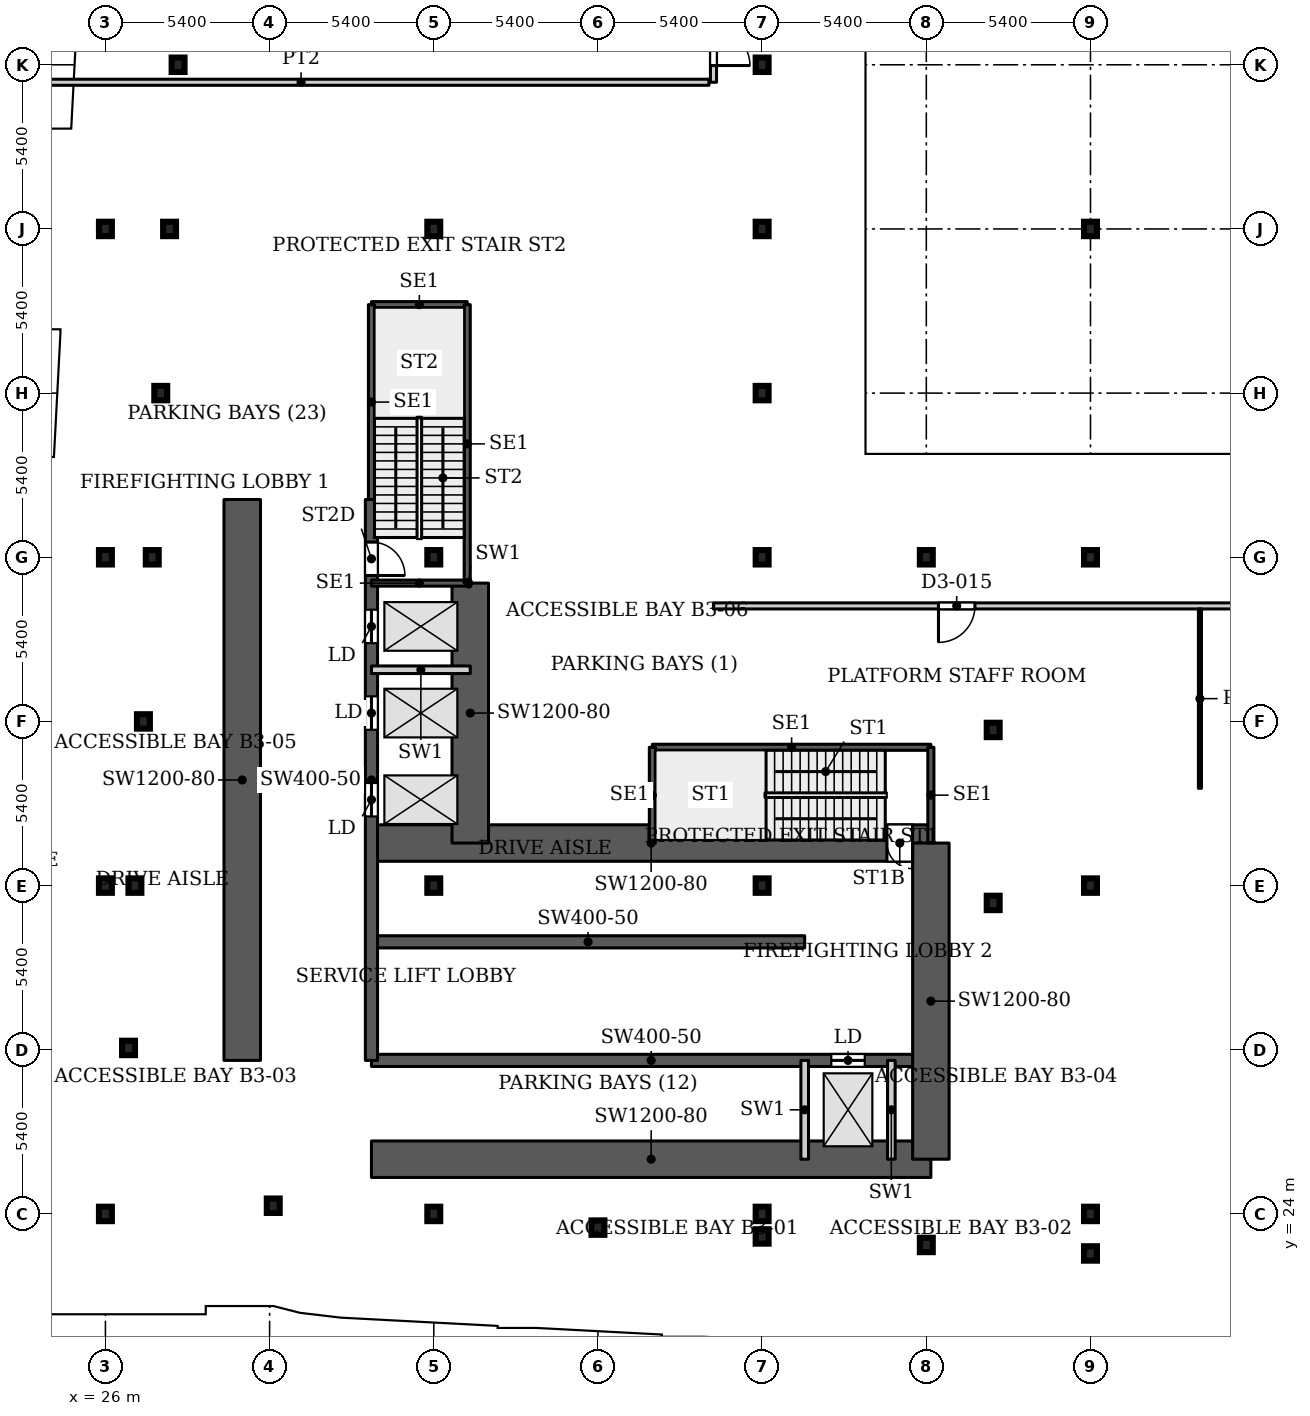
"""IFC4 building model, lengths in metres.
Left out: names, types, materials, properties, quantities, classifications, styles, units other than length and angle.
Written with IfcOpenShell. Run it as: python <this file> out.ifc"""

import sys

from ifc_helpers import new_model, si_unit, direction, frame, frame_2d, origin, origin_2d, place, context, subcontext, project, spatial, rectangle, i_section, extrude, source, transform, mapped, element, fill, save


model = new_model("IFC4")
c1 = context("Model", 3, precision=1e-05, world=origin(), true_north=direction((0.0, 1.0)))
c2 = subcontext(c1, "Body", "Model", "MODEL_VIEW")
j1 = project(units=[si_unit("LENGTHUNIT", "METRE"), si_unit("PLANEANGLEUNIT", "RADIAN")], contexts=[c1])
p1 = place(None, origin())
s1 = spatial("IfcSite", under=j1, at=p1, CompositionType="ELEMENT")
p2 = place(p1, origin())
s2 = spatial("IfcBuilding", under=s1, at=p2, CompositionType="ELEMENT")
p3 = place(p2, frame((0.0, 0.0, -15.0)))
s3 = spatial("IfcBuildingStorey", under=s2, at=p3, CompositionType="ELEMENT", Elevation=-15.0)
for number, where, z_axis, x_axis in (
    (1, (26.0, 24.0, 0.0), (0.0, 0.0, 1.0), (1.0, 0.0, 0.0)),
    (2, (36.8, 24.0, 0.0), (0.0, 0.0, 1.0), (1.0, 0.0, 0.0)),
    (3, (47.6, 24.0, 0.0), (0.0, 0.0, 1.0), (1.0, 0.0, 0.0)),
    (4, (58.4, 24.0, 0.0), (0.0, 0.0, 1.0), (1.0, 0.0, 0.0)),
    (5, (26.0, 34.8, 0.0), (0.0, 0.0, 1.0), (1.0, 0.0, 0.0)),
    (6, (36.8, 34.8, 0.0), (0.0, 0.0, 1.0), (1.0, 0.0, 0.0)),
    (7, (47.6, 34.8, 0.0), (0.0, 0.0, 1.0), (1.0, 0.0, 0.0)),
    (8, (58.4, 34.8, 0.0), (0.0, 0.0, 1.0), (1.0, 0.0, 0.0)),
    (9, (26.0, 45.6, 0.0), (0.0, 0.0, 1.0), (1.0, 0.0, 0.0)),
    (10, (36.8, 45.6, 0.0), (0.0, 0.0, 1.0), (1.0, 0.0, 0.0)),
    (11, (47.6, 45.6, 0.0), (0.0, 0.0, 1.0), (1.0, 0.0, 0.0)),
    (12, (58.4, 45.6, 0.0), (0.0, 0.0, 1.0), (1.0, 0.0, 0.0)),
    (13, (26.0, 56.4, 0.0), (0.0, 0.0, 1.0), (1.0, 0.0, 0.0)),
    (14, (36.8, 56.4, 0.0), (0.0, 0.0, 1.0), (1.0, 0.0, 0.0)),
    (15, (47.6, 56.4, 0.0), (0.0, 0.0, 1.0), (1.0, 0.0, 0.0)),
    (16, (58.4, 56.4, 0.0), (0.0, 0.0, 1.0), (1.0, 0.0, 0.0)),
    (17, (58.4, 22.7, 0.0), (0.0, 0.0, 1.0), (1.0, 0.0, 0.0)),
    (18, (53.0, 22.98, 0.0), (0.0, 0.0, 1.0), (1.0, 0.0, 0.0)),
    (19, (47.6, 23.26, 0.0), (0.0, 0.0, 1.0), (1.0, 0.0, 0.0)),
    (20, (42.2, 23.55, 0.0), (0.0, 0.0, 1.0), (1.0, 0.0, 0.0)),
    (21, (31.52, 24.27, 0.0), (0.0, 0.0, 1.0), (1.0, 0.0, 0.0)),
    (22, (26.76, 29.46, 0.0), (0.0, 0.0, 1.0), (1.0, 0.0, 0.0)),
    (23, (26.97, 34.8, 0.0), (0.0, 0.0, 1.0), (1.0, 0.0, 0.0)),
    (24, (27.25, 40.2, 0.0), (0.0, 0.0, 1.0), (1.0, 0.0, 0.0)),
    (25, (27.54, 45.6, 0.0), (0.0, 0.0, 1.0), (1.0, 0.0, 0.0)),
    (26, (53.0, 45.6, 0.0), (0.0, 0.0, 1.0), (1.0, 0.0, 0.0)),
    (27, (27.82, 51.0, 0.0), (0.0, 0.0, 1.0), (1.0, 0.0, 0.0)),
    (28, (47.6, 51.0, 0.0), (0.0, 0.0, 1.0), (1.0, 0.0, 0.0)),
    (29, (28.11, 56.4, 0.0), (0.0, 0.0, 1.0), (1.0, 0.0, 0.0)),
    (30, (28.39, 61.8, 0.0), (0.0, 0.0, 1.0), (1.0, 0.0, 0.0)),
    (31, (47.6, 61.8, 0.0), (0.0, 0.0, 1.0), (1.0, 0.0, 0.0)),
    (32, (55.2, 34.23, 0.0), (0.0, 0.0, 1.0), (1.0, 0.0, 0.0)),
    (33, (55.2, 39.92, 0.0), (0.0, 0.0, 1.0), (1.0, 0.0, 0.0)),
):
    element("IfcColumn", number, at=place(p3, frame(where, z_axis=z_axis, x_axis=x_axis)), inside=s3, PredefinedType="COLUMN", context=c2, shape_type="SweptSolid", body=[
        extrude(i_section(OverallWidth=0.424, OverallDepth=0.474, WebThickness=0.048, FlangeThickness=0.077, FilletRadius=0.014, at=origin_2d()), origin(), (0.0, 0.0, 1.0), 5.0),
    ])
p4 = place(p3, frame((34.75, 25.8, 0.0), z_axis=(0.0, 0.0, 1.0), x_axis=(1.0, 0.0, 0.0)))
e34 = element("IfcWall", 34, at=p4, inside=s3, PredefinedType="SHEAR", context=c2, shape_type="SweptSolid", body=[
    extrude(rectangle(XDim=18.4, YDim=1.2, at=frame_2d((9.2, 0.0))), origin(), (0.0, 0.0, 1.0), 5.0),
])
p5 = place(p3, frame((34.75, 29.05, 0.0), z_axis=(0.0, 0.0, 1.0), x_axis=(1.0, 0.0, 0.0)))
e35 = element("IfcWall", 35, at=p5, inside=s3, PredefinedType="SHEAR", context=c2, shape_type="SweptSolid", body=[
    extrude(rectangle(XDim=18.4, YDim=0.4, at=frame_2d((9.2, 0.0))), origin(), (0.0, 0.0, 1.0), 5.0),
])
p6 = place(p5, frame((15.125, 0.0, 0.0)))
e36 = element("IfcOpeningElement", 36, at=p6, cuts=e35, PredefinedType="OPENING", context=c2, shape_type="SweptSolid", body=[
    extrude(rectangle(XDim=1.1, YDim=2.2, at=frame_2d((0.55, 1.1))), frame((0.0, 0.21, 0.0), z_axis=(0.0, -1.0, 0.0), x_axis=(1.0, 0.0, 0.0)), (0.0, 0.0, 1.0), 0.42),
])
p7 = place(p3, frame((34.75, 32.95, 0.0), z_axis=(0.0, 0.0, 1.0), x_axis=(1.0, 0.0, 0.0)))
e37 = element("IfcWall", 37, at=p7, inside=s3, PredefinedType="SHEAR", context=c2, shape_type="SweptSolid", body=[
    extrude(rectangle(XDim=14.25, YDim=0.4, at=frame_2d((7.125, 0.0))), origin(), (0.0, 0.0, 1.0), 5.0),
])
p8 = place(p3, frame((34.75, 36.2, 0.0), z_axis=(0.0, 0.0, 1.0), x_axis=(1.0, 0.0, 0.0)))
e38 = element("IfcWall", 38, at=p8, inside=s3, PredefinedType="SHEAR", context=c2, shape_type="SweptSolid", body=[
    extrude(rectangle(XDim=18.4, YDim=1.2, at=frame_2d((9.2, 0.0))), origin(), (0.0, 0.0, 1.0), 5.0),
])
p9 = place(p8, frame((16.955, 0.0, 0.0)))
e39 = element("IfcOpeningElement", 39, at=p9, cuts=e38, PredefinedType="OPENING", context=c2, shape_type="SweptSolid", body=[
    extrude(rectangle(XDim=0.843, YDim=2.2, at=frame_2d((0.421, 1.1))), frame((0.0, 0.61, 0.0), z_axis=(0.0, -1.0, 0.0), x_axis=(1.0, 0.0, 0.0)), (0.0, 0.0, 1.0), 1.22),
])
p10 = place(p3, frame((34.75, 29.05, 0.0), z_axis=(0.0, 0.0, 1.0), x_axis=(0.0, 1.0, 0.0)))
e40 = element("IfcWall", 40, at=p10, inside=s3, PredefinedType="SHEAR", context=c2, shape_type="SweptSolid", body=[
    extrude(rectangle(XDim=18.45, YDim=0.4, at=frame_2d((9.225, 0.0))), origin(), (0.0, 0.0, 1.0), 5.0),
])
p11 = place(p10, frame((8.025, 0.0, 0.0)))
e41 = element("IfcOpeningElement", 41, at=p11, cuts=e40, PredefinedType="OPENING", context=c2, shape_type="SweptSolid", body=[
    extrude(rectangle(XDim=1.1, YDim=2.2, at=frame_2d((0.55, 1.1))), frame((0.0, 0.21, 0.0), z_axis=(0.0, -1.0, 0.0), x_axis=(1.0, 0.0, 0.0)), (0.0, 0.0, 1.0), 0.42),
])
p12 = place(p10, frame((10.875, 0.0, 0.0)))
e42 = element("IfcOpeningElement", 42, at=p12, cuts=e40, PredefinedType="OPENING", context=c2, shape_type="SweptSolid", body=[
    extrude(rectangle(XDim=1.1, YDim=2.2, at=frame_2d((0.55, 1.1))), frame((0.0, 0.21, 0.0), z_axis=(0.0, -1.0, 0.0), x_axis=(1.0, 0.0, 0.0)), (0.0, 0.0, 1.0), 0.42),
])
p13 = place(p10, frame((13.725, 0.0, 0.0)))
e43 = element("IfcOpeningElement", 43, at=p13, cuts=e40, PredefinedType="OPENING", context=c2, shape_type="SweptSolid", body=[
    extrude(rectangle(XDim=1.1, YDim=2.2, at=frame_2d((0.55, 1.1))), frame((0.0, 0.21, 0.0), z_axis=(0.0, -1.0, 0.0), x_axis=(1.0, 0.0, 0.0)), (0.0, 0.0, 1.0), 0.42),
])
p14 = place(p10, frame((15.95, 0.0, 0.0)))
e44 = element("IfcOpeningElement", 44, at=p14, cuts=e40, PredefinedType="OPENING", context=c2, shape_type="SweptSolid", body=[
    extrude(rectangle(XDim=1.1, YDim=2.2, at=frame_2d((0.55, 1.1))), frame((0.0, 0.21, 0.0), z_axis=(0.0, -1.0, 0.0), x_axis=(1.0, 0.0, 0.0)), (0.0, 0.0, 1.0), 0.42),
])
p15 = place(p3, frame((38.0, 36.2, 0.0), z_axis=(0.0, 0.0, 1.0), x_axis=(0.0, 1.0, 0.0)))
e45 = element("IfcWall", 45, at=p15, inside=s3, PredefinedType="SHEAR", context=c2, shape_type="SweptSolid", body=[
    extrude(rectangle(XDim=8.55, YDim=1.2, at=frame_2d((4.275, 0.0))), origin(), (0.0, 0.0, 1.0), 5.0),
])
p16 = place(p3, frame((30.5, 29.05, 0.0), z_axis=(0.0, 0.0, 1.0), x_axis=(0.0, 1.0, 0.0)))
e46 = element("IfcWall", 46, at=p16, inside=s3, PredefinedType="SHEAR", context=c2, shape_type="SweptSolid", body=[
    extrude(rectangle(XDim=18.45, YDim=1.2, at=frame_2d((9.225, 0.0))), origin(), (0.0, 0.0, 1.0), 5.0),
])
p17 = place(p3, frame((53.15, 25.8, 0.0), z_axis=(0.0, 0.0, 1.0), x_axis=(0.0, 1.0, 0.0)))
e47 = element("IfcWall", 47, at=p17, inside=s3, PredefinedType="SHEAR", context=c2, shape_type="SweptSolid", body=[
    extrude(rectangle(XDim=10.4, YDim=1.2, at=frame_2d((5.2, 0.0))), origin(), (0.0, 0.0, 1.0), 5.0),
])
p18 = place(p3, frame((43.99, 39.35, 0.0), z_axis=(0.0, 0.0, 1.0), x_axis=(1.0, 0.0, 0.0)))
e48 = element("IfcWall", 48, at=p18, inside=s3, PredefinedType="SHEAR", context=c2, shape_type="SweptSolid", body=[
    extrude(rectangle(XDim=9.16, YDim=0.2, at=frame_2d((4.58, 0.0))), origin(), (0.0, 0.0, 1.0), 5.0),
])
for number, where, z_axis, x_axis in (
    (49, (43.99, 36.2, 0.0), (0.0, 0.0, 1.0), (0.0, 1.0, 0.0)),
    (50, (53.15, 36.2, 0.0), (0.0, 0.0, 1.0), (0.0, 1.0, 0.0)),
):
    element("IfcWall", number, at=place(p3, frame(where, z_axis=z_axis, x_axis=x_axis)), inside=s3, PredefinedType="SHEAR", context=c2, shape_type="SweptSolid", body=[
        extrude(rectangle(XDim=3.15, YDim=0.2, at=frame_2d((1.575, 0.0))), origin(), (0.0, 0.0, 1.0), 5.0),
    ])
for number, where, z_axis, x_axis in (
    (51, (34.75, 44.75, 0.0), (0.0, 0.0, 1.0), (1.0, 0.0, 0.0)),
    (52, (34.75, 53.91, 0.0), (0.0, 0.0, 1.0), (1.0, 0.0, 0.0)),
):
    element("IfcWall", number, at=place(p3, frame(where, z_axis=z_axis, x_axis=x_axis)), inside=s3, PredefinedType="SHEAR", context=c2, shape_type="SweptSolid", body=[
        extrude(rectangle(XDim=3.15, YDim=0.2, at=frame_2d((1.575, 0.0))), origin(), (0.0, 0.0, 1.0), 5.0),
    ])
p19 = place(p3, frame((34.75, 47.5, 0.0), z_axis=(0.0, 0.0, 1.0), x_axis=(0.0, 1.0, 0.0)))
e53 = element("IfcWall", 53, at=p19, inside=s3, PredefinedType="SHEAR", context=c2, shape_type="SweptSolid", body=[
    extrude(rectangle(XDim=6.41, YDim=0.2, at=frame_2d((3.205, 0.0))), origin(), (0.0, 0.0, 1.0), 5.0),
])
p20 = place(p3, frame((37.9, 44.75, 0.0), z_axis=(0.0, 0.0, 1.0), x_axis=(0.0, 1.0, 0.0)))
e54 = element("IfcWall", 54, at=p20, inside=s3, PredefinedType="SHEAR", context=c2, shape_type="SweptSolid", body=[
    extrude(rectangle(XDim=9.16, YDim=0.2, at=frame_2d((4.58, 0.0))), origin(), (0.0, 0.0, 1.0), 5.0),
])
for number, where, z_axis, x_axis in (
    (55, (49.0, 25.8, 0.0), (0.0, 0.0, 1.0), (0.0, 1.0, 0.0)),
    (56, (51.85, 25.8, 0.0), (0.0, 0.0, 1.0), (0.0, 1.0, 0.0)),
    (57, (34.75, 41.9, 0.0), (0.0, 0.0, 1.0), (1.0, 0.0, 0.0)),
):
    element("IfcWall", number, at=place(p3, frame(where, z_axis=z_axis, x_axis=x_axis)), inside=s3, PredefinedType="PARTITIONING", context=c2, shape_type="SweptSolid", body=[
        extrude(rectangle(XDim=3.25, YDim=0.25, at=frame_2d((1.625, 0.0))), origin(), (0.0, 0.0, 1.0), 5.0),
    ])
p21 = place(p3, frame((37.9, 44.75, 0.0), z_axis=(0.0, 0.0, 1.0), x_axis=(1.0, 0.0, 0.0)))
e58 = element("IfcWall", 58, at=p21, inside=s3, PredefinedType="PARTITIONING", context=c2, shape_type="SweptSolid", body=[
    extrude(rectangle(XDim=0.1, YDim=0.25, at=frame_2d((0.05, 0.0))), origin(), (0.0, 0.0, 1.0), 5.0),
])
p22 = place(p3, frame((19.02, 61.225, 0.0), z_axis=(0.0, 0.0, 1.0), x_axis=(1.0, 0.0, 0.0)))
e59 = element("IfcWall", 59, at=p22, inside=s3, PredefinedType="PARTITIONING", context=c2, shape_type="SweptSolid", body=[
    extrude(rectangle(XDim=26.83, YDim=0.2, at=frame_2d((13.415, 0.0))), origin(), (0.0, 0.0, 1.0), 4.68),
])
p23 = place(p3, frame((46.0, 44.0, 0.0), z_axis=(0.0, 0.0, 1.0), x_axis=(1.0, 0.0, 0.0)))
e60 = element("IfcWall", 60, at=p23, inside=s3, PredefinedType="PARTITIONING", context=c2, shape_type="SweptSolid", body=[
    extrude(rectangle(XDim=62.0, YDim=0.2, at=frame_2d((31.0, 0.0))), origin(), (0.0, 0.0, 1.0), 4.68),
])
p24 = place(p23, frame((7.4, 0.0, 0.0)))
e61 = element("IfcOpeningElement", 61, at=p24, cuts=e60, PredefinedType="OPENING", context=c2, shape_type="SweptSolid", body=[
    extrude(rectangle(XDim=1.2, YDim=2.1, at=frame_2d((0.6, 1.05))), frame((0.0, 0.11, 0.0), z_axis=(0.0, -1.0, 0.0), x_axis=(1.0, 0.0, 0.0)), (0.0, 0.0, 1.0), 0.22),
])
p25 = place(p23, frame((21.4, 0.0, 0.0)))
e62 = element("IfcOpeningElement", 62, at=p25, cuts=e60, PredefinedType="OPENING", context=c2, shape_type="SweptSolid", body=[
    extrude(rectangle(XDim=1.2, YDim=2.1, at=frame_2d((0.6, 1.05))), frame((0.0, 0.11, 0.0), z_axis=(0.0, -1.0, 0.0), x_axis=(1.0, 0.0, 0.0)), (0.0, 0.0, 1.0), 0.22),
])
p26 = place(p23, frame((35.4, 0.0, 0.0)))
e63 = element("IfcOpeningElement", 63, at=p26, cuts=e60, PredefinedType="OPENING", context=c2, shape_type="SweptSolid", body=[
    extrude(rectangle(XDim=1.2, YDim=2.1, at=frame_2d((0.6, 1.05))), frame((0.0, 0.11, 0.0), z_axis=(0.0, -1.0, 0.0), x_axis=(1.0, 0.0, 0.0)), (0.0, 0.0, 1.0), 0.22),
])
p27 = place(p23, frame((46.4, 0.0, 0.0)))
e64 = element("IfcOpeningElement", 64, at=p27, cuts=e60, PredefinedType="OPENING", context=c2, shape_type="SweptSolid", body=[
    extrude(rectangle(XDim=1.0, YDim=2.1, at=frame_2d((0.5, 1.05))), frame((0.0, 0.11, 0.0), z_axis=(0.0, -1.0, 0.0), x_axis=(1.0, 0.0, 0.0)), (0.0, 0.0, 1.0), 0.22),
])
p28 = place(p23, frame((56.4, 0.0, 0.0)))
e65 = element("IfcOpeningElement", 65, at=p28, cuts=e60, PredefinedType="OPENING", context=c2, shape_type="SweptSolid", body=[
    extrude(rectangle(XDim=1.0, YDim=2.1, at=frame_2d((0.5, 1.05))), frame((0.0, 0.11, 0.0), z_axis=(0.0, -1.0, 0.0), x_axis=(1.0, 0.0, 0.0)), (0.0, 0.0, 1.0), 0.22),
])
p29 = place(p23, frame((59.85, 0.0, 0.0)))
e66 = element("IfcOpeningElement", 66, at=p29, cuts=e60, PredefinedType="OPENING", context=c2, shape_type="SweptSolid", body=[
    extrude(rectangle(XDim=1.2, YDim=2.1, at=frame_2d((0.6, 1.05))), frame((0.0, 0.11, 0.0), z_axis=(0.0, -1.0, 0.0), x_axis=(1.0, 0.0, 0.0)), (0.0, 0.0, 1.0), 0.22),
])
p30 = place(p3, frame((46.0, 61.225, 0.0), z_axis=(0.0, 0.0, 1.0), x_axis=(0.0, 1.0, 0.0)))
e67 = element("IfcWall", 67, at=p30, inside=s3, PredefinedType="PARTITIONING", context=c2, shape_type="SweptSolid", body=[
    extrude(rectangle(XDim=2.4, YDim=0.2, at=frame_2d((1.2, 0.0))), origin(), (0.0, 0.0, 1.0), 4.68),
])
p31 = place(p30, frame((0.55, 0.0, 0.0)))
e68 = element("IfcOpeningElement", 68, at=p31, cuts=e67, PredefinedType="OPENING", context=c2, shape_type="SweptSolid", body=[
    extrude(rectangle(XDim=1.2, YDim=2.1, at=frame_2d((0.6, 1.05))), frame((0.0, 0.11, 0.0), z_axis=(0.0, -1.0, 0.0), x_axis=(1.0, 0.0, 0.0)), (0.0, 0.0, 1.0), 0.22),
])
p32 = place(p3, frame((62.0, 38.0, 0.0), z_axis=(0.0, 0.0, 1.0), x_axis=(0.0, 1.0, 0.0)))
e69 = element("IfcWall", 69, at=p32, inside=s3, PredefinedType="PARTITIONING", context=c2, shape_type="SweptSolid", body=[
    extrude(rectangle(XDim=5.9, YDim=0.1, at=frame_2d((2.95, 0.0))), origin(), (0.0, 0.0, 1.0), 4.68),
])
m1 = source(origin(), c2, "Body", "SweptSolid", [
    extrude(rectangle(XDim=1.1, YDim=2.2, at=frame_2d((0.55, 1.1))), frame((0.0, 0.025, 0.0), z_axis=(0.0, -1.0, 0.0), x_axis=(1.0, 0.0, 0.0)), (0.0, 0.0, 1.0), 0.05),
])
p33 = place(p11, origin())
e70 = element("IfcDoor", 70, at=p33, inside=s3, OperationType="SLIDING_TO_LEFT", PredefinedType="DOOR", context=c2, shape_type="MappedRepresentation", body=[
    mapped(m1, transform((0.0, 0.0, 0.0), x_axis=(1.0, 0.0, 0.0), y_axis=(0.0, 1.0, 0.0), z_axis=(0.0, 0.0, 1.0), scale=1.0)),
])
fill(e41, e70)
p34 = place(p12, origin())
e71 = element("IfcDoor", 71, at=p34, inside=s3, OperationType="SLIDING_TO_LEFT", PredefinedType="DOOR", context=c2, shape_type="MappedRepresentation", body=[
    mapped(m1, transform((0.0, 0.0, 0.0), x_axis=(1.0, 0.0, 0.0), y_axis=(0.0, 1.0, 0.0), z_axis=(0.0, 0.0, 1.0), scale=1.0)),
])
fill(e42, e71)
p35 = place(p13, origin())
e72 = element("IfcDoor", 72, at=p35, inside=s3, OperationType="SLIDING_TO_LEFT", PredefinedType="DOOR", context=c2, shape_type="MappedRepresentation", body=[
    mapped(m1, transform((0.0, 0.0, 0.0), x_axis=(1.0, 0.0, 0.0), y_axis=(0.0, 1.0, 0.0), z_axis=(0.0, 0.0, 1.0), scale=1.0)),
])
fill(e43, e72)
p36 = place(p6, origin())
e73 = element("IfcDoor", 73, at=p36, inside=s3, OperationType="SLIDING_TO_LEFT", PredefinedType="DOOR", context=c2, shape_type="MappedRepresentation", body=[
    mapped(m1, transform((0.0, 0.0, 0.0), x_axis=(1.0, 0.0, 0.0), y_axis=(0.0, 1.0, 0.0), z_axis=(0.0, 0.0, 1.0), scale=1.0)),
])
fill(e36, e73)
m2 = source(origin(), c2, "Body", "SweptSolid", [
    extrude(rectangle(XDim=0.843, YDim=2.2, at=frame_2d((0.421, 1.1))), frame((0.0, 0.025, 0.0), z_axis=(0.0, -1.0, 0.0), x_axis=(1.0, 0.0, 0.0)), (0.0, 0.0, 1.0), 0.05),
])
p37 = place(p9, origin())
e74 = element("IfcDoor", 74, at=p37, inside=s3, OperationType="SINGLE_SWING_RIGHT", PredefinedType="DOOR", context=c2, shape_type="MappedRepresentation", body=[
    mapped(m2, transform((0.0, 0.0, 0.0), x_axis=(1.0, 0.0, 0.0), y_axis=(0.0, 1.0, 0.0), z_axis=(0.0, 0.0, 1.0), scale=1.0)),
])
fill(e39, e74)
m3 = source(origin(), c2, "Body", "SweptSolid", [
    extrude(rectangle(XDim=1.1, YDim=2.2, at=frame_2d((0.55, 1.1))), frame((0.0, 0.025, 0.0), z_axis=(0.0, -1.0, 0.0), x_axis=(1.0, 0.0, 0.0)), (0.0, 0.0, 1.0), 0.05),
])
p38 = place(p14, origin())
e75 = element("IfcDoor", 75, at=p38, inside=s3, OperationType="SINGLE_SWING_RIGHT", PredefinedType="DOOR", context=c2, shape_type="MappedRepresentation", body=[
    mapped(m3, transform((0.0, 0.0, 0.0), x_axis=(1.0, 0.0, 0.0), y_axis=(0.0, 1.0, 0.0), z_axis=(0.0, 0.0, 1.0), scale=1.0)),
])
fill(e44, e75)
m4 = source(origin(), c2, "Body", "SweptSolid", [
    extrude(rectangle(XDim=1.2, YDim=2.1, at=frame_2d((0.6, 1.05))), frame((0.0, 0.025, 0.0), z_axis=(0.0, -1.0, 0.0), x_axis=(1.0, 0.0, 0.0)), (0.0, 0.0, 1.0), 0.05),
])
p39 = place(p31, origin())
e76 = element("IfcDoor", 76, at=p39, inside=s3, OperationType="SINGLE_SWING_RIGHT", PredefinedType="DOOR", context=c2, shape_type="MappedRepresentation", body=[
    mapped(m4, transform((0.0, 0.0, 0.0), x_axis=(1.0, 0.0, 0.0), y_axis=(0.0, 1.0, 0.0), z_axis=(0.0, 0.0, 1.0), scale=1.0)),
])
fill(e68, e76)
p40 = place(p24, origin())
e77 = element("IfcDoor", 77, at=p40, inside=s3, OperationType="SINGLE_SWING_RIGHT", PredefinedType="DOOR", context=c2, shape_type="MappedRepresentation", body=[
    mapped(m4, transform((0.0, 0.0, 0.0), x_axis=(1.0, 0.0, 0.0), y_axis=(0.0, 1.0, 0.0), z_axis=(0.0, 0.0, 1.0), scale=1.0)),
])
fill(e61, e77)
save(model, sys.argv[1])
